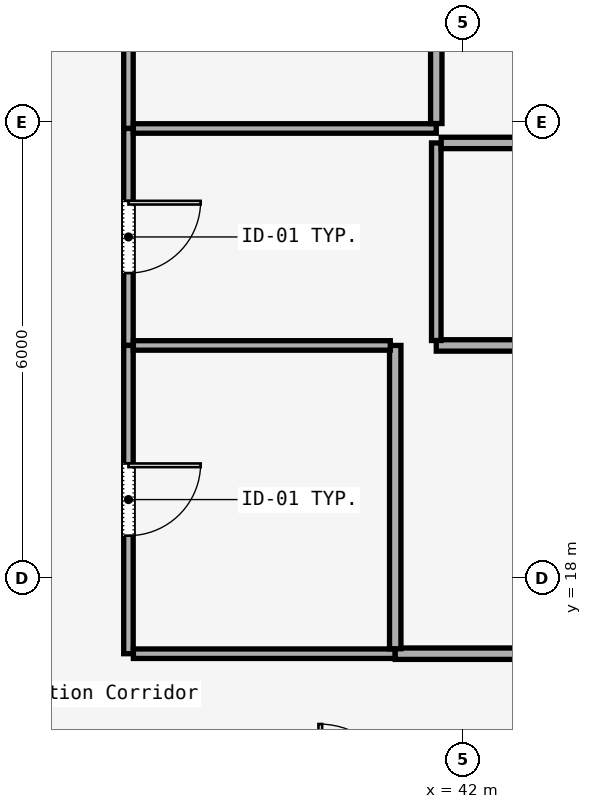
"""IFC4 building model, lengths in metres.
Left out: names, types, materials, properties, quantities, classifications, styles, units other than length and angle.
Written with IfcOpenShell. Run it as: python <this file> out.ifc"""

import sys

from ifc_helpers import new_model, si_unit, direction, frame, frame_2d, origin, place, context, subcontext, project, spatial, rectangle, extrude, element, fill, save


model = new_model("IFC4")
c1 = context("Model", 3, precision=1e-05, world=origin(), true_north=direction((0.0, 1.0)))
c2 = subcontext(c1, "Body", "Model", "MODEL_VIEW")
j1 = project(units=[si_unit("LENGTHUNIT", "METRE"), si_unit("PLANEANGLEUNIT", "RADIAN")], contexts=[c1])
p1 = place(None, origin())
s1 = spatial("IfcSite", under=j1, at=p1, CompositionType="ELEMENT")
p2 = place(p1, origin())
s2 = spatial("IfcBuilding", under=s1, at=p2, CompositionType="ELEMENT")
p3 = place(p2, frame((0.0, 0.0, 149.8)))
s3 = spatial("IfcBuildingStorey", under=s2, at=p3, CompositionType="ELEMENT", Elevation=149.8)
p4 = place(p3, frame((37.6, 27.335, 0.0), z_axis=(0.0, 0.0, 1.0), x_axis=(0.0, -1.0, 0.0)))
e1 = element("IfcWall", 1, at=p4, inside=s3, PredefinedType="PARTITIONING", context=c2, shape_type="SweptSolid", body=[
    extrude(rectangle(XDim=3.424, YDim=0.125, at=frame_2d((1.712, 0.0))), origin(), (0.0, 0.0, 1.0), 3.01),
])
p5 = place(p4, frame((1.237, 0.0, 0.0)))
e2 = element("IfcOpeningElement", 2, at=p5, cuts=e1, PredefinedType="OPENING", context=c2, shape_type="SweptSolid", body=[
    extrude(rectangle(XDim=0.95, YDim=2.2, at=frame_2d((0.475, 1.1))), frame((0.0, 0.062, 0.0), z_axis=(0.0, -1.0, 0.0), x_axis=(1.0, 0.0, 0.0)), (0.0, 0.0, 1.0), 0.125),
])
p6 = place(p3, frame((37.6, 23.911, 0.0), z_axis=(0.0, 0.0, 1.0), x_axis=(0.0, -1.0, 0.0)))
e3 = element("IfcWall", 3, at=p6, inside=s3, PredefinedType="PARTITIONING", context=c2, shape_type="SweptSolid", body=[
    extrude(rectangle(XDim=2.855, YDim=0.125, at=frame_2d((1.427, 0.0))), origin(), (0.0, 0.0, 1.0), 3.01),
])
p7 = place(p6, frame((0.952, 0.0, 0.0)))
e4 = element("IfcOpeningElement", 4, at=p7, cuts=e3, PredefinedType="OPENING", context=c2, shape_type="SweptSolid", body=[
    extrude(rectangle(XDim=0.95, YDim=2.2, at=frame_2d((0.475, 1.1))), frame((0.0, 0.062, 0.0), z_axis=(0.0, -1.0, 0.0), x_axis=(1.0, 0.0, 0.0)), (0.0, 0.0, 1.0), 0.125),
])
p8 = place(p3, frame((37.6, 21.056, 0.0), z_axis=(0.0, 0.0, 1.0), x_axis=(0.0, -1.0, 0.0)))
e5 = element("IfcWall", 5, at=p8, inside=s3, PredefinedType="PARTITIONING", context=c2, shape_type="SweptSolid", body=[
    extrude(rectangle(XDim=4.056, YDim=0.125, at=frame_2d((2.028, 0.0))), origin(), (0.0, 0.0, 1.0), 3.01),
])
p9 = place(p8, frame((1.553, 0.0, 0.0)))
e6 = element("IfcOpeningElement", 6, at=p9, cuts=e5, PredefinedType="OPENING", context=c2, shape_type="SweptSolid", body=[
    extrude(rectangle(XDim=0.95, YDim=2.2, at=frame_2d((0.475, 1.1))), frame((0.0, 0.062, 0.0), z_axis=(0.0, -1.0, 0.0), x_axis=(1.0, 0.0, 0.0)), (0.0, 0.0, 1.0), 0.125),
])
p10 = place(p3, frame((37.665, 17.0, 0.0), z_axis=(0.0, 0.0, 1.0), x_axis=(1.0, 0.0, 0.0)))
e7 = element("IfcWall", 7, at=p10, inside=s3, PredefinedType="PARTITIONING", context=c2, shape_type="SweptSolid", body=[
    extrude(rectangle(XDim=3.445, YDim=0.125, at=frame_2d((1.723, 0.0))), origin(), (0.0, 0.0, 1.0), 3.01),
])
p11 = place(p3, frame((41.11, 17.0, 0.0), z_axis=(0.0, 0.0, 1.0), x_axis=(1.0, 0.0, 0.0)))
e8 = element("IfcWall", 8, at=p11, inside=s3, PredefinedType="PARTITIONING", context=c2, shape_type="SweptSolid", body=[
    extrude(rectangle(XDim=5.49, YDim=0.15, at=frame_2d((2.745, 0.0))), origin(), (0.0, 0.0, 1.0), 3.01),
])
p12 = place(p11, frame((2.27, 0.0, 0.0)))
e9 = element("IfcOpeningElement", 9, at=p12, cuts=e8, PredefinedType="OPENING", context=c2, shape_type="SweptSolid", body=[
    extrude(rectangle(XDim=0.95, YDim=2.2, at=frame_2d((0.475, 1.1))), frame((0.0, 0.075, 0.0), z_axis=(0.0, -1.0, 0.0), x_axis=(1.0, 0.0, 0.0)), (0.0, 0.0, 1.0), 0.15),
])
p13 = place(p3, frame((41.11, 21.056, 0.0), z_axis=(0.0, 0.0, 1.0), x_axis=(0.0, -1.0, 0.0)))
e10 = element("IfcWall", 10, at=p13, inside=s3, PredefinedType="PARTITIONING", context=c2, shape_type="SweptSolid", body=[
    extrude(rectangle(XDim=3.991, YDim=0.15, at=frame_2d((1.996, 0.0))), origin(), (0.0, 0.0, 1.0), 3.01),
])
p14 = place(p3, frame((37.665, 21.056, 0.0), z_axis=(0.0, 0.0, 1.0), x_axis=(1.0, 0.0, 0.0)))
e11 = element("IfcWall", 11, at=p14, inside=s3, PredefinedType="PARTITIONING", context=c2, shape_type="SweptSolid", body=[
    extrude(rectangle(XDim=3.38, YDim=0.125, at=frame_2d((1.69, 0.0))), origin(), (0.0, 0.0, 1.0), 3.01),
])
p15 = place(p3, frame((41.65, 21.056, 0.0), z_axis=(0.0, 0.0, 1.0), x_axis=(1.0, 0.0, 0.0)))
e12 = element("IfcWall", 12, at=p15, inside=s3, PredefinedType="PARTITIONING", context=c2, shape_type="SweptSolid", body=[
    extrude(rectangle(XDim=4.885, YDim=0.15, at=frame_2d((2.442, 0.0))), origin(), (0.0, 0.0, 1.0), 3.01),
])
p16 = place(p3, frame((41.65, 21.121, 0.0), z_axis=(0.0, 0.0, 1.0), x_axis=(0.0, 1.0, 0.0)))
e13 = element("IfcWall", 13, at=p16, inside=s3, PredefinedType="PARTITIONING", context=c2, shape_type="SweptSolid", body=[
    extrude(rectangle(XDim=2.599, YDim=0.125, at=frame_2d((1.3, 0.0))), origin(), (0.0, 0.0, 1.0), 3.01),
])
p17 = place(p3, frame((41.715, 23.72, 0.0), z_axis=(0.0, 0.0, 1.0), x_axis=(1.0, 0.0, 0.0)))
e14 = element("IfcWall", 14, at=p17, inside=s3, PredefinedType="PARTITIONING", context=c2, shape_type="SweptSolid", body=[
    extrude(rectangle(XDim=4.82, YDim=0.15, at=frame_2d((2.41, 0.0))), origin(), (0.0, 0.0, 1.0), 3.01),
])
p18 = place(p3, frame((37.665, 23.911, 0.0), z_axis=(0.0, 0.0, 1.0), x_axis=(1.0, 0.0, 0.0)))
e15 = element("IfcWall", 15, at=p18, inside=s3, PredefinedType="PARTITIONING", context=c2, shape_type="SweptSolid", body=[
    extrude(rectangle(XDim=3.985, YDim=0.125, at=frame_2d((1.992, 0.0))), origin(), (0.0, 0.0, 1.0), 3.01),
])
p19 = place(p3, frame((41.65, 23.976, 0.0), z_axis=(0.0, 0.0, 1.0), x_axis=(0.0, 1.0, 0.0)))
e16 = element("IfcWall", 16, at=p19, inside=s3, PredefinedType="PARTITIONING", context=c2, shape_type="SweptSolid", body=[
    extrude(rectangle(XDim=3.424, YDim=0.15, at=frame_2d((1.712, 0.0))), origin(), (0.0, 0.0, 1.0), 3.01),
])
p20 = place(p9, origin())
e17 = element("IfcDoor", 17, at=p20, inside=s3, OperationType="SINGLE_SWING_RIGHT", PredefinedType="DOOR", context=c2, shape_type="SweptSolid", body=[
    extrude(rectangle(XDim=0.95, YDim=2.2, at=frame_2d((0.475, 1.1))), frame((0.0, 0.025, 0.0), z_axis=(0.0, -1.0, 0.0), x_axis=(1.0, 0.0, 0.0)), (0.0, 0.0, 1.0), 0.05),
])
fill(e6, e17)
p21 = place(p7, origin())
e18 = element("IfcDoor", 18, at=p21, inside=s3, OperationType="SINGLE_SWING_RIGHT", PredefinedType="DOOR", context=c2, shape_type="SweptSolid", body=[
    extrude(rectangle(XDim=0.95, YDim=2.2, at=frame_2d((0.475, 1.1))), frame((0.0, 0.025, 0.0), z_axis=(0.0, -1.0, 0.0), x_axis=(1.0, 0.0, 0.0)), (0.0, 0.0, 1.0), 0.05),
])
fill(e4, e18)
save(model, sys.argv[1])
